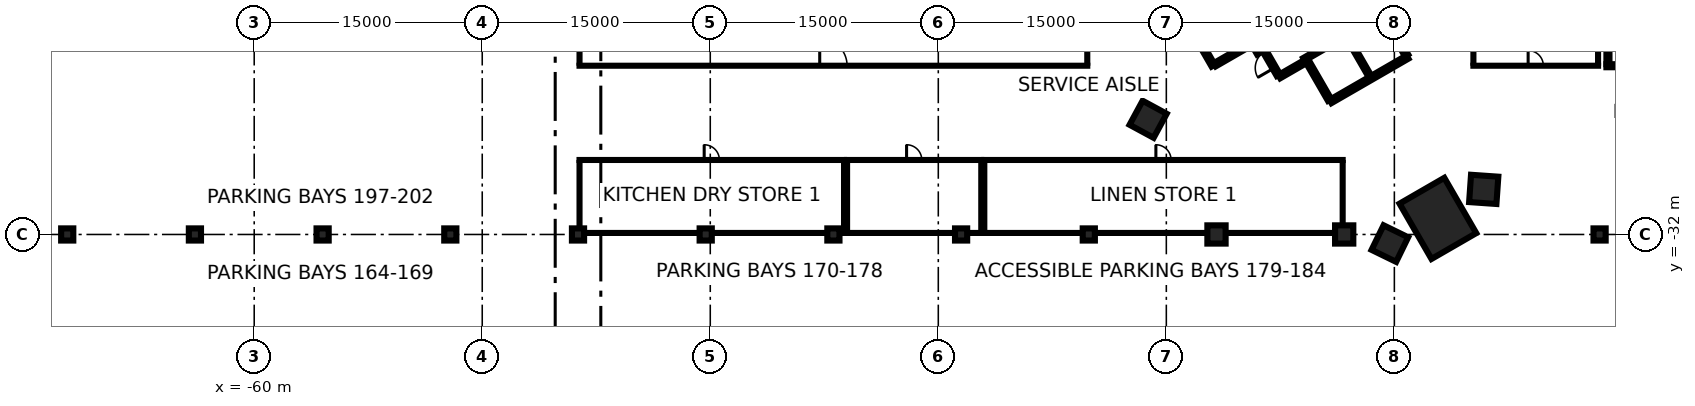
"""IFC4 building model, lengths in metres.
Left out: names, types, materials, properties, quantities, classifications, styles, units other than length and angle.
Written with IfcOpenShell. Run it as: python <this file> out.ifc"""

import sys

from ifc_helpers import new_model, si_unit, direction, frame, frame_2d, origin, origin_2d, place, context, subcontext, project, spatial, rectangle, extrude, element, fill, save


model = new_model("IFC4")
c1 = context("Model", 3, precision=1e-05, world=origin(), true_north=direction((0.0, 1.0)))
c2 = subcontext(c1, "Body", "Model", "MODEL_VIEW")
j1 = project(units=[si_unit("LENGTHUNIT", "METRE"), si_unit("PLANEANGLEUNIT", "RADIAN")], contexts=[c1])
p1 = place(None, origin())
s1 = spatial("IfcSite", under=j1, at=p1, CompositionType="ELEMENT")
p2 = place(p1, origin())
s2 = spatial("IfcBuilding", under=s1, at=p2, CompositionType="ELEMENT")
p3 = place(p2, frame((0.0, 0.0, -3.6)))
s3 = spatial("IfcBuildingStorey", under=s2, at=p3, CompositionType="ELEMENT", Elevation=-3.6)
p4 = place(p3, frame((17.865, -30.942, -0.4), z_axis=(0.0, 0.0, 1.0), x_axis=(-0.5, 0.866025403784, 0.0)))
e1 = element("IfcColumn", 1, at=p4, inside=s3, PredefinedType="COLUMN", context=c2, shape_type="SweptSolid", body=[
    extrude(rectangle(XDim=4.2, YDim=3.4, at=origin_2d()), origin(), (0.0, 0.0, 1.0), 3.55),
])
for number, where, z_axis, x_axis in (
    (2, (20.879, -29.034, -0.4), (0.0, 0.0, 1.0), (-0.998, 0.07, 0.0)),
    (3, (-1.197, -24.423, -0.4), (0.0, 0.0, 1.0), (0.476, 0.879, 0.0)),
    (4, (14.705, -32.599, -0.4), (0.0, 0.0, 1.0), (0.438, 0.899, 0.0)),
):
    element("IfcColumn", number, at=place(p3, frame(where, z_axis=z_axis, x_axis=x_axis)), inside=s3, PredefinedType="COLUMN", context=c2, shape_type="SweptSolid", body=[
        extrude(rectangle(XDim=1.8, YDim=1.8, at=origin_2d()), origin(), (0.0, 0.0, 1.0), 3.55),
    ])
for number, where, z_axis, x_axis in (
    (5, (-72.3, -32.0, -0.4), (0.0, 0.0, 1.0), (1.0, 0.0, 0.0)),
    (6, (-63.9, -32.0, -0.4), (0.0, 0.0, 1.0), (1.0, 0.0, 0.0)),
    (7, (-55.5, -32.0, -0.4), (0.0, 0.0, 1.0), (1.0, 0.0, 0.0)),
    (8, (-47.1, -32.0, -0.4), (0.0, 0.0, 1.0), (1.0, 0.0, 0.0)),
    (9, (-38.7, -32.0, -0.4), (0.0, 0.0, 1.0), (1.0, 0.0, 0.0)),
    (10, (-30.3, -32.0, -0.4), (0.0, 0.0, 1.0), (1.0, 0.0, 0.0)),
    (11, (-21.9, -32.0, -0.4), (0.0, 0.0, 1.0), (1.0, 0.0, 0.0)),
    (12, (-13.5, -32.0, -0.4), (0.0, 0.0, 1.0), (1.0, 0.0, 0.0)),
    (13, (-5.1, -32.0, -0.4), (0.0, 0.0, 1.0), (1.0, 0.0, 0.0)),
):
    element("IfcColumn", number, at=place(p3, frame(where, z_axis=z_axis, x_axis=x_axis)), inside=s3, PredefinedType="COLUMN", context=c2, shape_type="SweptSolid", body=[
        extrude(rectangle(XDim=0.8, YDim=0.8, at=origin_2d()), origin(), (0.0, 0.0, 1.0), 3.55),
    ])
for number, where, z_axis, x_axis in (
    (14, (3.3, -32.0, -0.4), (0.0, 0.0, 1.0), (1.0, 0.0, 0.0)),
    (15, (11.7, -32.0, -0.4), (0.0, 0.0, 1.0), (1.0, 0.0, 0.0)),
):
    element("IfcColumn", number, at=place(p3, frame(where, z_axis=z_axis, x_axis=x_axis)), inside=s3, PredefinedType="COLUMN", context=c2, shape_type="SweptSolid", body=[
        extrude(rectangle(XDim=1.2, YDim=1.2, at=origin_2d()), origin(), (0.0, 0.0, 1.0), 3.55),
    ])
p5 = place(p3, frame((28.5, -32.0, -0.4), z_axis=(0.0, 0.0, 1.0), x_axis=(1.0, 0.0, 0.0)))
e16 = element("IfcColumn", 16, at=p5, inside=s3, PredefinedType="COLUMN", context=c2, shape_type="SweptSolid", body=[
    extrude(rectangle(XDim=0.8, YDim=0.8, at=origin_2d()), origin(), (0.0, 0.0, 1.0), 3.55),
])
p6 = place(p3, frame((15.865, -20.328, 0.0), z_axis=(0.0, 0.0, 1.0), x_axis=(-0.86602852612, -0.499994591916, 0.0)))
e17 = element("IfcWall", 17, at=p6, inside=s3, PredefinedType="SHEAR", context=c2, shape_type="SweptSolid", body=[
    extrude(rectangle(XDim=5.85, YDim=0.25, at=frame_2d((2.925, 0.0))), origin(), (0.0, 0.0, 1.0), 3.15),
])
for number, where, z_axis, x_axis in (
    (18, (14.315, -17.644, 0.0), (0.0, 0.0, 1.0), (0.5, -0.866, 0.0)),
    (19, (10.736, -23.145, 0.0), (0.0, 0.0, 1.0), (-0.5, 0.866, 0.0)),
):
    element("IfcWall", number, at=place(p3, frame(where, z_axis=z_axis, x_axis=x_axis)), inside=s3, PredefinedType="SHEAR", context=c2, shape_type="SweptSolid", body=[
        extrude(rectangle(XDim=2.974, YDim=0.25, at=frame_2d((1.487, 0.0))), origin(), (0.0, 0.0, 1.0), 3.15),
    ])
p7 = place(p3, frame((3.085, -20.894, 0.0), z_axis=(0.0, 0.0, 1.0), x_axis=(-0.499978833458, 0.866037623948, 0.0)))
e20 = element("IfcWall", 20, at=p7, inside=s3, PredefinedType="SHEAR", context=c2, shape_type="SweptSolid", body=[
    extrude(rectangle(XDim=3.05, YDim=0.25, at=frame_2d((1.525, 0.0))), origin(), (0.0, 0.0, 1.0), 3.15),
])
p8 = place(p3, frame((5.675, -19.399, 0.0), z_axis=(0.0, 0.0, 1.0), x_axis=(-0.866026637627, -0.499997862916, 0.0)))
e21 = element("IfcWall", 21, at=p8, inside=s3, PredefinedType="SHEAR", context=c2, shape_type="SweptSolid", body=[
    extrude(rectangle(XDim=2.865, YDim=0.25, at=frame_2d((1.432, 0.0))), origin(), (0.0, 0.0, 1.0), 3.15),
])
p9 = place(p3, frame((9.14, -20.631, 0.0), z_axis=(0.0, 0.0, 1.0), x_axis=(-0.866043531843, -0.499968599967, 0.0)))
e22 = element("IfcWall", 22, at=p9, inside=s3, PredefinedType="SHEAR", context=c2, shape_type="SweptSolid", body=[
    extrude(rectangle(XDim=1.975, YDim=0.25, at=frame_2d((0.987, 0.0))), origin(), (0.0, 0.0, 1.0), 3.15),
])
p10 = place(p3, frame((7.367, -21.51, 0.0), z_axis=(0.0, 0.0, 1.0), x_axis=(-0.499983108224, 0.866035156036, 0.0)))
e23 = element("IfcWall", 23, at=p10, inside=s3, PredefinedType="SHEAR", context=c2, shape_type="SweptSolid", body=[
    extrude(rectangle(XDim=1.865, YDim=0.25, at=frame_2d((0.932, 0.0))), origin(), (0.0, 0.0, 1.0), 3.15),
])
p11 = place(p10, frame((0.535, 0.0, 0.0)))
e24 = element("IfcOpeningElement", 24, at=p11, cuts=e23, PredefinedType="OPENING", context=c2, shape_type="SweptSolid", body=[
    extrude(rectangle(XDim=1.25, YDim=2.1, at=frame_2d((0.625, 1.05))), frame((0.0, 0.135, 0.0), z_axis=(0.0, -1.0, 0.0), x_axis=(1.0, 0.0, 0.0)), (0.0, 0.0, 1.0), 0.27),
])
p12 = place(p3, frame((6.08, -20.1, 0.0), z_axis=(0.0, 0.0, 1.0), x_axis=(-0.500051773299, 0.865995510393, 0.0)))
e25 = element("IfcWall", 25, at=p12, inside=s3, PredefinedType="SHEAR", context=c2, shape_type="SweptSolid", body=[
    extrude(rectangle(XDim=0.685, YDim=0.25, at=frame_2d((0.342, 0.0))), origin(), (0.0, 0.0, 1.0), 3.15),
])
p13 = place(p3, frame((9.052, -20.48, 0.0), z_axis=(0.0, 0.0, 1.0), x_axis=(0.866030299012, 0.499991521122, 0.0)))
e26 = element("IfcWall", 26, at=p13, inside=s3, PredefinedType="SHEAR", context=c2, shape_type="SweptSolid", body=[
    extrude(rectangle(XDim=6.1, YDim=0.2, at=frame_2d((3.05, 0.0))), origin(), (0.0, 0.0, 1.0), 3.15),
])
p14 = place(p3, frame((11.875, -18.967, 0.0), z_axis=(0.0, 0.0, 1.0), x_axis=(0.49998131003, -0.866036194175, 0.0)))
e27 = element("IfcWall", 27, at=p14, inside=s3, PredefinedType="SHEAR", context=c2, shape_type="SweptSolid", body=[
    extrude(rectangle(XDim=3.048, YDim=0.2, at=frame_2d((1.524, 0.0))), origin(), (0.0, 0.0, 1.0), 3.15),
])
p15 = place(p3, frame((-38.7, -31.9, 0.0), z_axis=(0.0, 0.0, 1.0), x_axis=(1.0, 0.0, 0.0)))
e28 = element("IfcWall", 28, at=p15, inside=s3, PredefinedType="PARTITIONING", context=c2, shape_type="SweptSolid", body=[
    extrude(rectangle(XDim=17.6, YDim=0.2, at=frame_2d((8.8, 0.0))), origin(), (0.0, 0.0, 1.0), 3.15),
])
p16 = place(p3, frame((-38.7, -27.1, 0.0), z_axis=(0.0, 0.0, 1.0), x_axis=(1.0, 0.0, 0.0)))
e29 = element("IfcWall", 29, at=p16, inside=s3, PredefinedType="PARTITIONING", context=c2, shape_type="SweptSolid", body=[
    extrude(rectangle(XDim=17.6, YDim=0.2, at=frame_2d((8.8, 0.0))), origin(), (0.0, 0.0, 1.0), 3.15),
])
p17 = place(p16, frame((8.3, 0.0, 0.0)))
e30 = element("IfcOpeningElement", 30, at=p17, cuts=e29, PredefinedType="OPENING", context=c2, shape_type="SweptSolid", body=[
    extrude(rectangle(XDim=1.0, YDim=2.1, at=frame_2d((0.5, 1.05))), frame((0.0, 0.11, 0.0), z_axis=(0.0, -1.0, 0.0), x_axis=(1.0, 0.0, 0.0)), (0.0, 0.0, 1.0), 0.22),
])
p18 = place(p3, frame((-38.6, -31.6, 0.0), z_axis=(0.0, 0.0, 1.0), x_axis=(0.0, 1.0, 0.0)))
e31 = element("IfcWall", 31, at=p18, inside=s3, PredefinedType="PARTITIONING", context=c2, shape_type="SweptSolid", body=[
    extrude(rectangle(XDim=4.4, YDim=0.2, at=frame_2d((2.2, 0.0))), origin(), (0.0, 0.0, 1.0), 3.15),
])
p19 = place(p3, frame((-21.2, -31.8, 0.0), z_axis=(0.0, 0.0, 1.0), x_axis=(0.0, 1.0, 0.0)))
e32 = element("IfcWall", 32, at=p19, inside=s3, PredefinedType="PARTITIONING", context=c2, shape_type="SweptSolid", body=[
    extrude(rectangle(XDim=4.6, YDim=0.2, at=frame_2d((2.3, 0.0))), origin(), (0.0, 0.0, 1.0), 3.15),
])
p20 = place(p3, frame((-21.1, -31.9, 0.0), z_axis=(0.0, 0.0, 1.0), x_axis=(1.0, 0.0, 0.0)))
e33 = element("IfcWall", 33, at=p20, inside=s3, PredefinedType="PARTITIONING", context=c2, shape_type="SweptSolid", body=[
    extrude(rectangle(XDim=9.027, YDim=0.2, at=frame_2d((4.514, 0.0))), origin(), (0.0, 0.0, 1.0), 3.15),
])
p21 = place(p3, frame((-21.1, -27.1, 0.0), z_axis=(0.0, 0.0, 1.0), x_axis=(1.0, 0.0, 0.0)))
e34 = element("IfcWall", 34, at=p21, inside=s3, PredefinedType="PARTITIONING", context=c2, shape_type="SweptSolid", body=[
    extrude(rectangle(XDim=9.027, YDim=0.2, at=frame_2d((4.514, 0.0))), origin(), (0.0, 0.0, 1.0), 3.15),
])
p22 = place(p21, frame((4.013, 0.0, 0.0)))
e35 = element("IfcOpeningElement", 35, at=p22, cuts=e34, PredefinedType="OPENING", context=c2, shape_type="SweptSolid", body=[
    extrude(rectangle(XDim=1.0, YDim=2.1, at=frame_2d((0.5, 1.05))), frame((0.0, 0.11, 0.0), z_axis=(0.0, -1.0, 0.0), x_axis=(1.0, 0.0, 0.0)), (0.0, 0.0, 1.0), 0.22),
])
for number, where, z_axis, x_axis in (
    (36, (-21.0, -31.8, 0.0), (0.0, 0.0, 1.0), (0.0, 1.0, 0.0)),
    (37, (-12.173, -31.8, 0.0), (0.0, 0.0, 1.0), (0.0, 1.0, 0.0)),
):
    element("IfcWall", number, at=place(p3, frame(where, z_axis=z_axis, x_axis=x_axis)), inside=s3, PredefinedType="PARTITIONING", context=c2, shape_type="SweptSolid", body=[
        extrude(rectangle(XDim=4.6, YDim=0.2, at=frame_2d((2.3, 0.0))), origin(), (0.0, 0.0, 1.0), 3.15),
    ])
p23 = place(p3, frame((-12.073, -31.9, 0.0), z_axis=(0.0, 0.0, 1.0), x_axis=(1.0, 0.0, 0.0)))
e38 = element("IfcWall", 38, at=p23, inside=s3, PredefinedType="PARTITIONING", context=c2, shape_type="SweptSolid", body=[
    extrude(rectangle(XDim=23.773, YDim=0.2, at=frame_2d((11.886, 0.0))), origin(), (0.0, 0.0, 1.0), 3.15),
])
p24 = place(p3, frame((-12.073, -27.1, 0.0), z_axis=(0.0, 0.0, 1.0), x_axis=(1.0, 0.0, 0.0)))
e39 = element("IfcWall", 39, at=p24, inside=s3, PredefinedType="PARTITIONING", context=c2, shape_type="SweptSolid", body=[
    extrude(rectangle(XDim=23.773, YDim=0.2, at=frame_2d((11.886, 0.0))), origin(), (0.0, 0.0, 1.0), 3.15),
])
p25 = place(p24, frame((11.387, 0.0, 0.0)))
e40 = element("IfcOpeningElement", 40, at=p25, cuts=e39, PredefinedType="OPENING", context=c2, shape_type="SweptSolid", body=[
    extrude(rectangle(XDim=1.0, YDim=2.1, at=frame_2d((0.5, 1.05))), frame((0.0, 0.11, 0.0), z_axis=(0.0, -1.0, 0.0), x_axis=(1.0, 0.0, 0.0)), (0.0, 0.0, 1.0), 0.22),
])
p26 = place(p3, frame((-11.973, -31.8, 0.0), z_axis=(0.0, 0.0, 1.0), x_axis=(0.0, 1.0, 0.0)))
e41 = element("IfcWall", 41, at=p26, inside=s3, PredefinedType="PARTITIONING", context=c2, shape_type="SweptSolid", body=[
    extrude(rectangle(XDim=4.6, YDim=0.2, at=frame_2d((2.3, 0.0))), origin(), (0.0, 0.0, 1.0), 3.15),
])
p27 = place(p3, frame((11.6, -31.4, 0.0), z_axis=(0.0, 0.0, 1.0), x_axis=(0.0, 1.0, 0.0)))
e42 = element("IfcWall", 42, at=p27, inside=s3, PredefinedType="PARTITIONING", context=c2, shape_type="SweptSolid", body=[
    extrude(rectangle(XDim=4.2, YDim=0.2, at=frame_2d((2.1, 0.0))), origin(), (0.0, 0.0, 1.0), 3.15),
])
p28 = place(p3, frame((-38.7, -20.9, 0.0), z_axis=(0.0, 0.0, 1.0), x_axis=(1.0, 0.0, 0.0)))
e43 = element("IfcWall", 43, at=p28, inside=s3, PredefinedType="PARTITIONING", context=c2, shape_type="SweptSolid", body=[
    extrude(rectangle(XDim=33.6, YDim=0.2, at=frame_2d((16.8, 0.0))), origin(), (0.0, 0.0, 1.0), 3.15),
])
p29 = place(p28, frame((15.9, 0.0, 0.0)))
e44 = element("IfcOpeningElement", 44, at=p29, cuts=e43, PredefinedType="OPENING", context=c2, shape_type="SweptSolid", body=[
    extrude(rectangle(XDim=1.8, YDim=2.1, at=frame_2d((0.9, 1.05))), frame((0.0, 0.11, 0.0), z_axis=(0.0, -1.0, 0.0), x_axis=(1.0, 0.0, 0.0)), (0.0, 0.0, 1.0), 0.22),
])
for number, where, z_axis, x_axis in (
    (45, (-38.6, -20.8, 0.0), (0.0, 0.0, 1.0), (0.0, 1.0, 0.0)),
    (46, (-5.2, -20.8, 0.0), (0.0, 0.0, 1.0), (0.0, 1.0, 0.0)),
):
    element("IfcWall", number, at=place(p3, frame(where, z_axis=z_axis, x_axis=x_axis)), inside=s3, PredefinedType="PARTITIONING", context=c2, shape_type="SweptSolid", body=[
        extrude(rectangle(XDim=4.2, YDim=0.2, at=frame_2d((2.1, 0.0))), origin(), (0.0, 0.0, 1.0), 3.15),
    ])
p30 = place(p3, frame((20.1, -20.9, 0.0), z_axis=(0.0, 0.0, 1.0), x_axis=(1.0, 0.0, 0.0)))
e47 = element("IfcWall", 47, at=p30, inside=s3, PredefinedType="PARTITIONING", context=c2, shape_type="SweptSolid", body=[
    extrude(rectangle(XDim=8.4, YDim=0.2, at=frame_2d((4.2, 0.0))), origin(), (0.0, 0.0, 1.0), 3.15),
])
p31 = place(p30, frame((3.7, 0.0, 0.0)))
e48 = element("IfcOpeningElement", 48, at=p31, cuts=e47, PredefinedType="OPENING", context=c2, shape_type="SweptSolid", body=[
    extrude(rectangle(XDim=1.0, YDim=2.1, at=frame_2d((0.5, 1.05))), frame((0.0, 0.11, 0.0), z_axis=(0.0, -1.0, 0.0), x_axis=(1.0, 0.0, 0.0)), (0.0, 0.0, 1.0), 0.22),
])
p32 = place(p3, frame((20.2, -20.8, 0.0), z_axis=(0.0, 0.0, 1.0), x_axis=(0.0, 1.0, 0.0)))
e49 = element("IfcWall", 49, at=p32, inside=s3, PredefinedType="PARTITIONING", context=c2, shape_type="SweptSolid", body=[
    extrude(rectangle(XDim=4.2, YDim=0.2, at=frame_2d((2.1, 0.0))), origin(), (0.0, 0.0, 1.0), 3.15),
])
p33 = place(p3, frame((28.4, -20.8, 0.0), z_axis=(0.0, 0.0, 1.0), x_axis=(0.0, 1.0, 0.0)))
e50 = element("IfcWall", 50, at=p33, inside=s3, PredefinedType="PARTITIONING", context=c2, shape_type="SweptSolid", body=[
    extrude(rectangle(XDim=4.4, YDim=0.2, at=frame_2d((2.2, 0.0))), origin(), (0.0, 0.0, 1.0), 3.15),
])
p34 = place(p3, frame((29.05, -20.8, 0.0), z_axis=(0.0, 0.0, 1.0), x_axis=(0.0, 1.0, 0.0)))
e51 = element("IfcWall", 51, at=p34, inside=s3, PredefinedType="SOLIDWALL", context=c2, shape_type="SweptSolid", body=[
    extrude(rectangle(XDim=9.6, YDim=0.2, at=frame_2d((4.8, 0.0))), origin(), (0.0, 0.0, 1.0), 3.15),
])
p35 = place(p3, frame((33.5, -20.9, 0.0), z_axis=(0.0, 0.0, 1.0), x_axis=(-1.0, 0.0, 0.0)))
e52 = element("IfcWall", 52, at=p35, inside=s3, PredefinedType="SOLIDWALL", context=c2, shape_type="SweptSolid", body=[
    extrude(rectangle(XDim=4.55, YDim=0.2, at=frame_2d((2.275, 0.0))), origin(), (0.0, 0.0, 1.0), 3.15),
])
p36 = place(p11, origin())
e53 = element("IfcDoor", 53, at=p36, inside=s3, OperationType="SINGLE_SWING_LEFT", PredefinedType="DOOR", context=c2, shape_type="SweptSolid", body=[
    extrude(rectangle(XDim=1.25, YDim=2.1, at=frame_2d((0.625, 1.05))), frame((0.0, 0.025, 0.0), z_axis=(0.0, -1.0, 0.0), x_axis=(1.0, 0.0, 0.0)), (0.0, 0.0, 1.0), 0.05),
])
fill(e24, e53)
p37 = place(p17, origin())
e54 = element("IfcDoor", 54, at=p37, inside=s3, OperationType="SINGLE_SWING_LEFT", PredefinedType="DOOR", context=c2, shape_type="SweptSolid", body=[
    extrude(rectangle(XDim=1.0, YDim=2.1, at=frame_2d((0.5, 1.05))), frame((0.0, 0.025, 0.0), z_axis=(0.0, -1.0, 0.0), x_axis=(1.0, 0.0, 0.0)), (0.0, 0.0, 1.0), 0.05),
])
fill(e30, e54)
p38 = place(p22, origin())
e55 = element("IfcDoor", 55, at=p38, inside=s3, OperationType="SINGLE_SWING_LEFT", PredefinedType="DOOR", context=c2, shape_type="SweptSolid", body=[
    extrude(rectangle(XDim=1.0, YDim=2.1, at=frame_2d((0.5, 1.05))), frame((0.0, 0.025, 0.0), z_axis=(0.0, -1.0, 0.0), x_axis=(1.0, 0.0, 0.0)), (0.0, 0.0, 1.0), 0.05),
])
fill(e35, e55)
p39 = place(p25, origin())
e56 = element("IfcDoor", 56, at=p39, inside=s3, OperationType="SINGLE_SWING_LEFT", PredefinedType="DOOR", context=c2, shape_type="SweptSolid", body=[
    extrude(rectangle(XDim=1.0, YDim=2.1, at=frame_2d((0.5, 1.05))), frame((0.0, 0.025, 0.0), z_axis=(0.0, -1.0, 0.0), x_axis=(1.0, 0.0, 0.0)), (0.0, 0.0, 1.0), 0.05),
])
fill(e40, e56)
p40 = place(p29, origin())
e57 = element("IfcDoor", 57, at=p40, inside=s3, OperationType="DOUBLE_DOOR_SINGLE_SWING", PredefinedType="DOOR", context=c2, shape_type="SweptSolid", body=[
    extrude(rectangle(XDim=1.8, YDim=2.1, at=frame_2d((0.9, 1.05))), frame((0.0, 0.025, 0.0), z_axis=(0.0, -1.0, 0.0), x_axis=(1.0, 0.0, 0.0)), (0.0, 0.0, 1.0), 0.05),
])
fill(e44, e57)
p41 = place(p31, origin())
e58 = element("IfcDoor", 58, at=p41, inside=s3, OperationType="SINGLE_SWING_LEFT", PredefinedType="DOOR", context=c2, shape_type="SweptSolid", body=[
    extrude(rectangle(XDim=1.0, YDim=2.1, at=frame_2d((0.5, 1.05))), frame((0.0, 0.025, 0.0), z_axis=(0.0, -1.0, 0.0), x_axis=(1.0, 0.0, 0.0)), (0.0, 0.0, 1.0), 0.05),
])
fill(e48, e58)
save(model, sys.argv[1])
